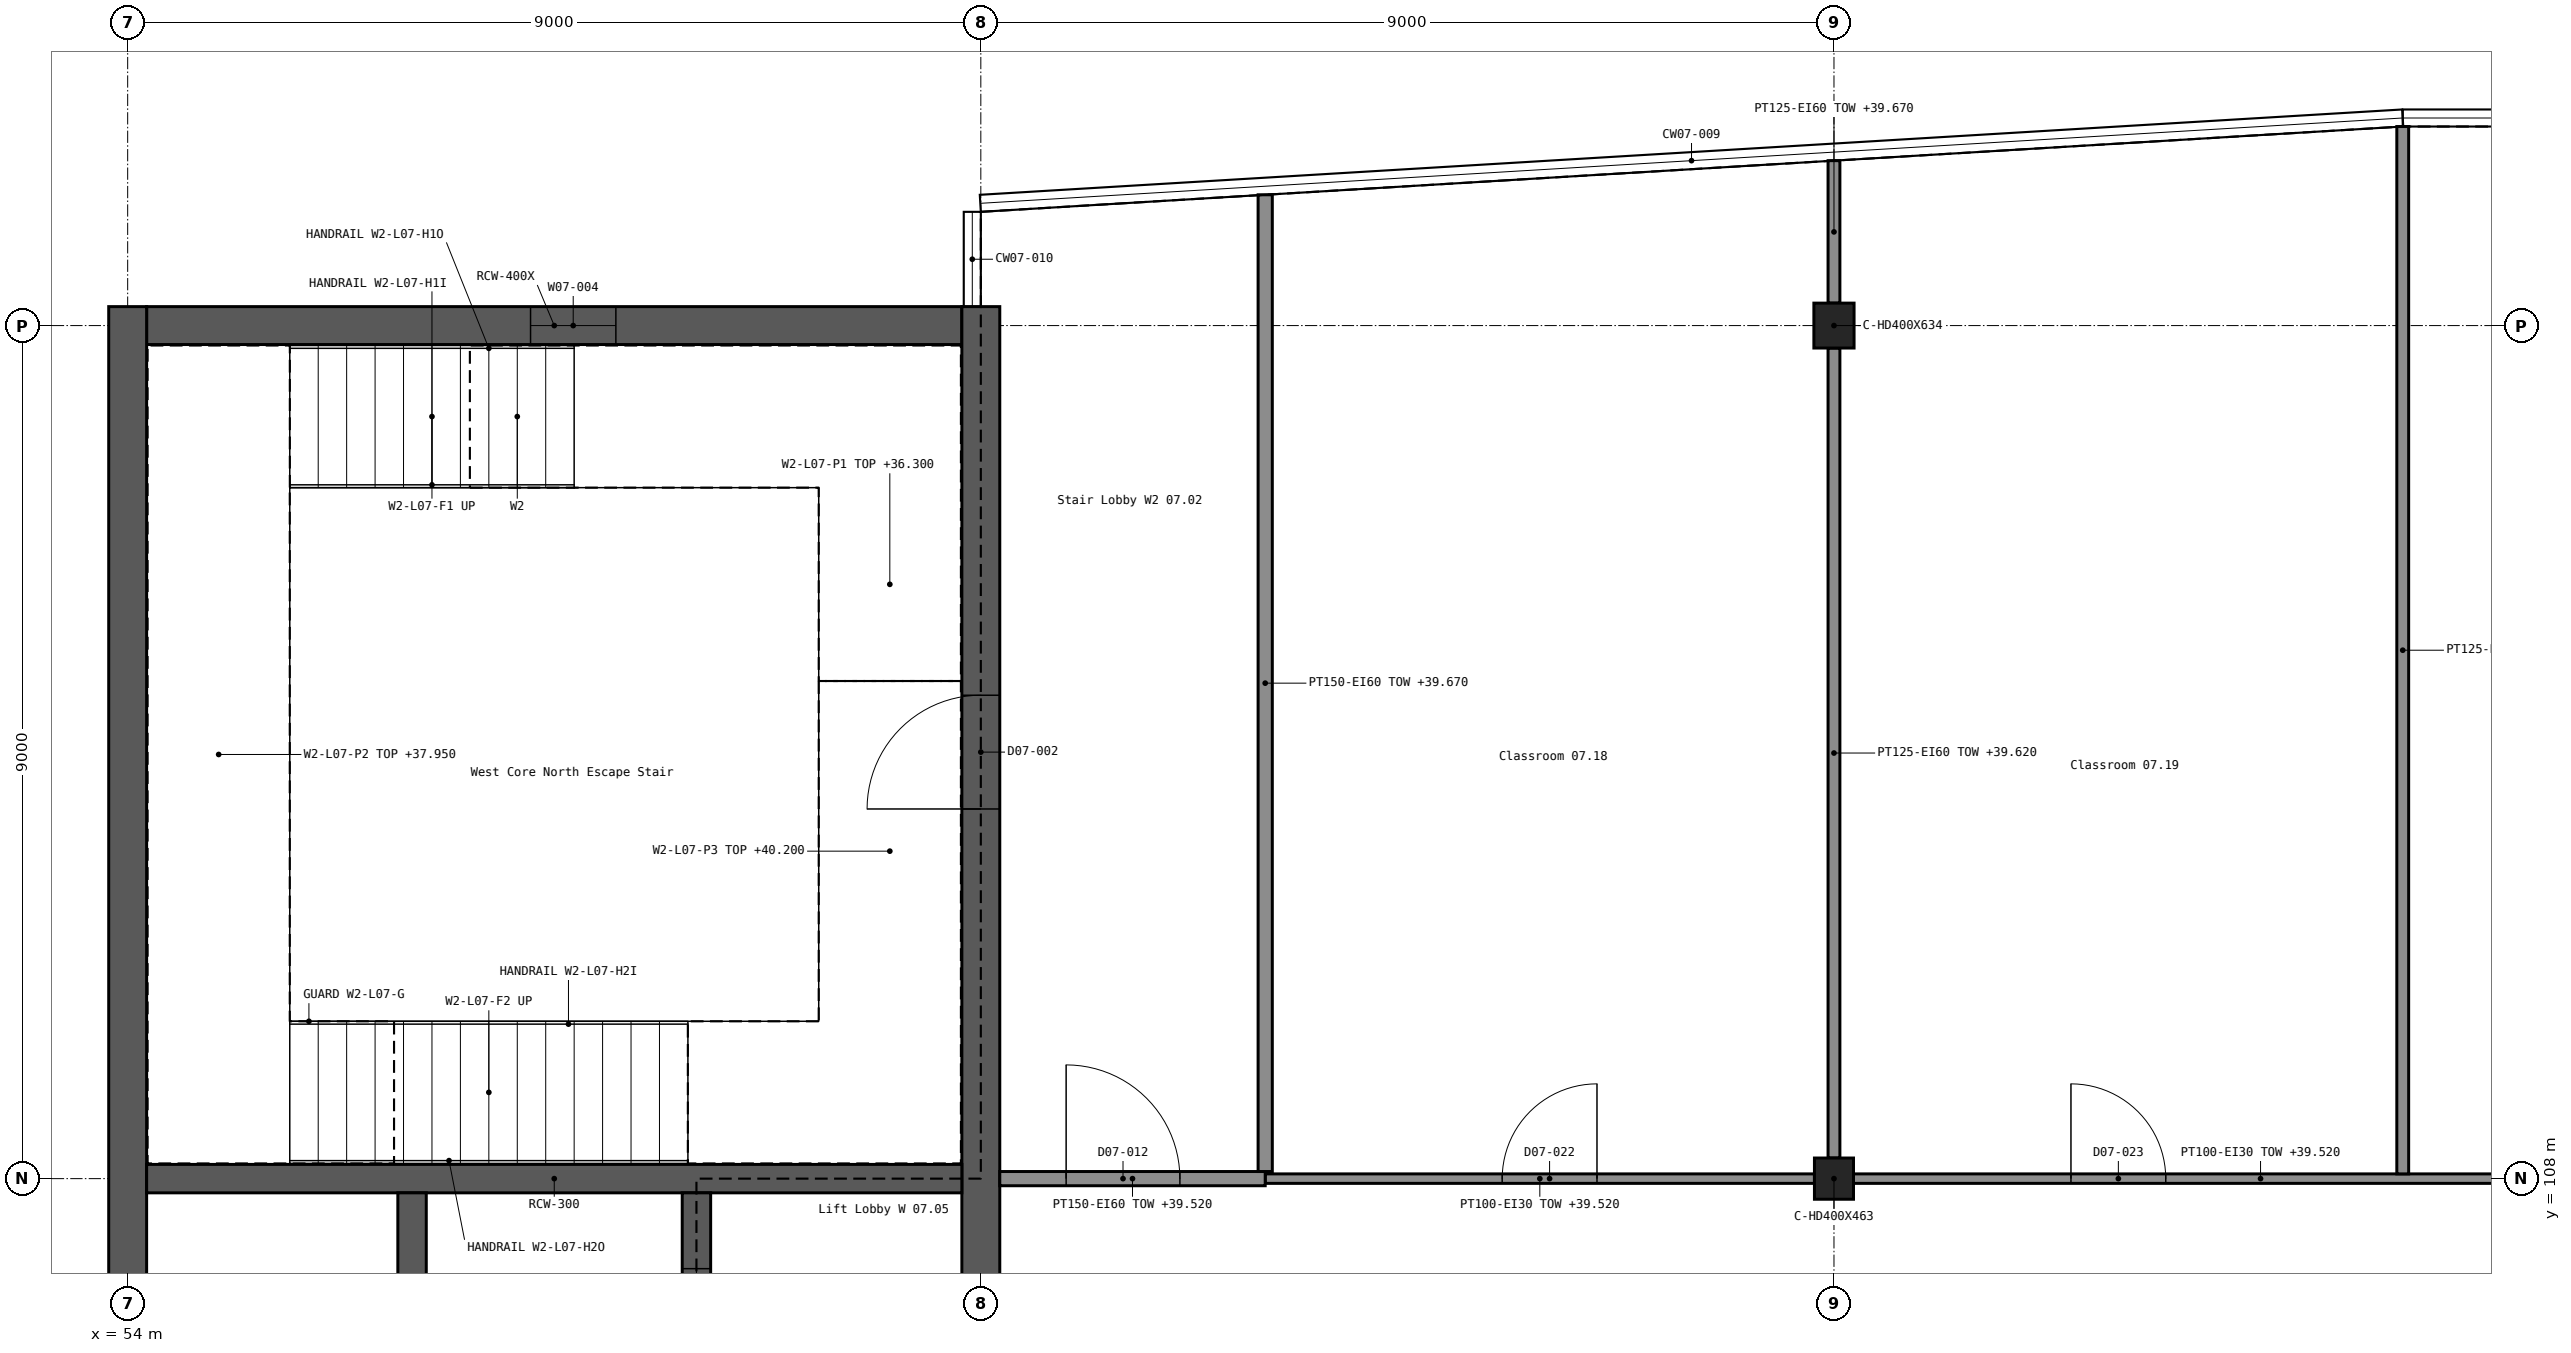
"""IFC4 building model, lengths in metres.
Left out: names, types, materials, properties, quantities, classifications, styles, units other than length and angle.
Written with IfcOpenShell. Run it as: python <this file> out.ifc"""

import sys

from ifc_helpers import new_model, si_unit, direction, frame, frame_2d, origin, origin_2d, place, context, subcontext, project, spatial, rectangle, i_section, extrude, element, fill, save


model = new_model("IFC4")
c1 = context("Model", 3, precision=1e-05, world=origin(), true_north=direction((0.0, 1.0)))
c2 = subcontext(c1, "Body", "Model", "MODEL_VIEW")
j1 = project(units=[si_unit("LENGTHUNIT", "METRE"), si_unit("PLANEANGLEUNIT", "RADIAN")], contexts=[c1])
p1 = place(None, origin())
s1 = spatial("IfcSite", under=j1, at=p1, CompositionType="ELEMENT")
p2 = place(p1, origin())
s2 = spatial("IfcBuilding", under=s1, at=p2, CompositionType="ELEMENT")
p3 = place(p2, frame((0.0, 0.0, 36.3)))
s3 = spatial("IfcBuildingStorey", under=s2, at=p3, CompositionType="ELEMENT", Elevation=36.3)
p4 = place(p3, frame((54.2, 117.0, 0.0), z_axis=(0.0, 0.0, 1.0), x_axis=(1.0, 0.0, 0.0)))
e1 = element("IfcWall", 1, at=p4, inside=s3, PredefinedType="SHEAR", context=c2, shape_type="SweptSolid", body=[
    extrude(rectangle(XDim=8.6, YDim=0.4, at=frame_2d((4.3, 0.0))), origin(), (0.0, 0.0, 1.0), 3.9),
])
p5 = place(p4, frame((4.05, 0.0, 1.2)))
e2 = element("IfcOpeningElement", 2, at=p5, cuts=e1, PredefinedType="OPENING", context=c2, shape_type="SweptSolid", body=[
    extrude(rectangle(XDim=0.9, YDim=1.5, at=frame_2d((0.45, 0.75))), frame((0.0, 0.211, 0.0), z_axis=(0.0, -1.0, 0.0), x_axis=(1.0, 0.0, 0.0)), (0.0, 0.0, 1.0), 0.422),
])
p6 = place(p3, frame((54.0, 89.8, 0.0), z_axis=(0.0, 0.0, 1.0), x_axis=(0.0, 1.0, 0.0)))
e3 = element("IfcWall", 3, at=p6, inside=s3, PredefinedType="SHEAR", context=c2, shape_type="SweptSolid", body=[
    extrude(rectangle(XDim=27.4, YDim=0.4, at=frame_2d((13.7, 0.0))), origin(), (0.0, 0.0, 1.0), 3.9),
])
p7 = place(p3, frame((63.0, 89.8, 0.0), z_axis=(0.0, 0.0, 1.0), x_axis=(0.0, 1.0, 0.0)))
e4 = element("IfcWall", 4, at=p7, inside=s3, PredefinedType="SHEAR", context=c2, shape_type="SweptSolid", body=[
    extrude(rectangle(XDim=27.4, YDim=0.4, at=frame_2d((13.7, 0.0))), origin(), (0.0, 0.0, 1.0), 3.9),
])
p8 = place(p7, frame((4.1, 0.0, 0.0)))
e5 = element("IfcOpeningElement", 5, at=p8, cuts=e4, PredefinedType="OPENING", context=c2, shape_type="SweptSolid", body=[
    extrude(rectangle(XDim=1.2, YDim=2.1, at=frame_2d((0.6, 1.05))), frame((0.0, 0.211, 0.0), z_axis=(0.0, -1.0, 0.0), x_axis=(1.0, 0.0, 0.0)), (0.0, 0.0, 1.0), 0.422),
])
p9 = place(p7, frame((22.1, 0.0, 0.0)))
e6 = element("IfcOpeningElement", 6, at=p9, cuts=e4, PredefinedType="OPENING", context=c2, shape_type="SweptSolid", body=[
    extrude(rectangle(XDim=1.2, YDim=2.1, at=frame_2d((0.6, 1.05))), frame((0.0, 0.211, 0.0), z_axis=(0.0, -1.0, 0.0), x_axis=(1.0, 0.0, 0.0)), (0.0, 0.0, 1.0), 0.422),
])
p10 = place(p7, frame((12.5, 0.0, 0.0)))
e7 = element("IfcOpeningElement", 7, at=p10, cuts=e4, PredefinedType="OPENING", context=c2, shape_type="SweptSolid", body=[
    extrude(rectangle(XDim=2.0, YDim=2.1, at=frame_2d((1.0, 1.05))), frame((0.0, 0.211, 0.0), z_axis=(0.0, -1.0, 0.0), x_axis=(1.0, 0.0, 0.0)), (0.0, 0.0, 1.0), 0.422),
])
p11 = place(p3, frame((54.2, 108.0, 0.0), z_axis=(0.0, 0.0, 1.0), x_axis=(1.0, 0.0, 0.0)))
e8 = element("IfcWall", 8, at=p11, inside=s3, PredefinedType="SHEAR", context=c2, shape_type="SweptSolid", body=[
    extrude(rectangle(XDim=8.6, YDim=0.3, at=frame_2d((4.3, 0.0))), origin(), (0.0, 0.0, 1.0), 3.9),
])
p12 = place(p3, frame((57.0, 99.15, 0.0), z_axis=(0.0, 0.0, 1.0), x_axis=(0.0, 1.0, 0.0)))
e9 = element("IfcWall", 9, at=p12, inside=s3, PredefinedType="SHEAR", context=c2, shape_type="SweptSolid", body=[
    extrude(rectangle(XDim=8.7, YDim=0.3, at=frame_2d((4.35, 0.0))), origin(), (0.0, 0.0, 1.0), 3.9),
])
p13 = place(p3, frame((60.0, 99.15, 0.0), z_axis=(0.0, 0.0, 1.0), x_axis=(0.0, 1.0, 0.0)))
e10 = element("IfcWall", 10, at=p13, inside=s3, PredefinedType="SHEAR", context=c2, shape_type="SweptSolid", body=[
    extrude(rectangle(XDim=8.7, YDim=0.3, at=frame_2d((4.35, 0.0))), origin(), (0.0, 0.0, 1.0), 3.9),
])
p14 = place(p13, frame((0.8, 0.0, 0.0)))
e11 = element("IfcOpeningElement", 11, at=p14, cuts=e10, PredefinedType="OPENING", context=c2, shape_type="SweptSolid", body=[
    extrude(rectangle(XDim=1.1, YDim=2.1, at=frame_2d((0.55, 1.05))), frame((0.0, 0.161, 0.0), z_axis=(0.0, -1.0, 0.0), x_axis=(1.0, 0.0, 0.0)), (0.0, 0.0, 1.0), 0.322),
])
p15 = place(p13, frame((3.8, 0.0, 0.0)))
e12 = element("IfcOpeningElement", 12, at=p15, cuts=e10, PredefinedType="OPENING", context=c2, shape_type="SweptSolid", body=[
    extrude(rectangle(XDim=1.1, YDim=2.1, at=frame_2d((0.55, 1.05))), frame((0.0, 0.161, 0.0), z_axis=(0.0, -1.0, 0.0), x_axis=(1.0, 0.0, 0.0)), (0.0, 0.0, 1.0), 0.322),
])
p16 = place(p13, frame((6.8, 0.0, 0.0)))
e13 = element("IfcOpeningElement", 13, at=p16, cuts=e10, PredefinedType="OPENING", context=c2, shape_type="SweptSolid", body=[
    extrude(rectangle(XDim=1.1, YDim=2.1, at=frame_2d((0.55, 1.05))), frame((0.0, 0.161, 0.0), z_axis=(0.0, -1.0, 0.0), x_axis=(1.0, 0.0, 0.0)), (0.0, 0.0, 1.0), 0.322),
])
p17 = place(p3, frame((72.0, 108.0, 0.0), z_axis=(0.0, 0.0, 1.0), x_axis=(1.0, 0.0, 0.0)))
e14 = element("IfcColumn", 14, at=p17, inside=s3, PredefinedType="COLUMN", context=c2, shape_type="SweptSolid", body=[
    extrude(i_section(OverallWidth=0.412, OverallDepth=0.435, WebThickness=0.036, FlangeThickness=0.057, FilletRadius=0.015, at=origin_2d()), origin(), (0.0, 0.0, 1.0), 3.9),
])
p18 = place(p3, frame((72.0, 117.0, 0.0), z_axis=(0.0, 0.0, 1.0), x_axis=(1.0, 0.0, 0.0)))
e15 = element("IfcColumn", 15, at=p18, inside=s3, PredefinedType="COLUMN", context=c2, shape_type="SweptSolid", body=[
    extrude(i_section(OverallWidth=0.424, OverallDepth=0.474, WebThickness=0.048, FlangeThickness=0.077, FilletRadius=0.015, at=origin_2d()), origin(), (0.0, 0.0, 1.0), 3.9),
])
p19 = place(p3, frame((66.0, 108.0, 0.0), z_axis=(0.0, 0.0, 1.0), x_axis=(1.0, 0.0, 0.0)))
e16 = element("IfcWall", 16, at=p19, inside=s3, PredefinedType="PARTITIONING", context=c2, shape_type="SweptSolid", body=[
    extrude(rectangle(XDim=5.794, YDim=0.1, at=frame_2d((2.897, 0.0))), origin(), (0.0, 0.0, 1.0), 3.22),
])
p20 = place(p19, frame((2.5, 0.0, 0.0)))
e17 = element("IfcOpeningElement", 17, at=p20, cuts=e16, PredefinedType="OPENING", context=c2, shape_type="SweptSolid", body=[
    extrude(rectangle(XDim=1.0, YDim=2.1, at=frame_2d((0.5, 1.05))), frame((0.0, 0.061, 0.0), z_axis=(0.0, -1.0, 0.0), x_axis=(1.0, 0.0, 0.0)), (0.0, 0.0, 1.0), 0.122),
])
p21 = place(p3, frame((72.206, 108.0, 0.0), z_axis=(0.0, 0.0, 1.0), x_axis=(1.0, 0.0, 0.0)))
e18 = element("IfcWall", 18, at=p21, inside=s3, PredefinedType="PARTITIONING", context=c2, shape_type="SweptSolid", body=[
    extrude(rectangle(XDim=8.588, YDim=0.1, at=frame_2d((4.294, 0.0))), origin(), (0.0, 0.0, 1.0), 3.22),
])
p22 = place(p21, frame((2.294, 0.0, 0.0)))
e19 = element("IfcOpeningElement", 19, at=p22, cuts=e18, PredefinedType="OPENING", context=c2, shape_type="SweptSolid", body=[
    extrude(rectangle(XDim=1.0, YDim=2.1, at=frame_2d((0.5, 1.05))), frame((0.0, 0.061, 0.0), z_axis=(0.0, -1.0, 0.0), x_axis=(1.0, 0.0, 0.0)), (0.0, 0.0, 1.0), 0.122),
])
p23 = place(p3, frame((63.2, 108.0, 0.0), z_axis=(0.0, 0.0, 1.0), x_axis=(1.0, 0.0, 0.0)))
e20 = element("IfcWall", 20, at=p23, inside=s3, PredefinedType="PARTITIONING", context=c2, shape_type="SweptSolid", body=[
    extrude(rectangle(XDim=2.8, YDim=0.15, at=frame_2d((1.4, 0.0))), origin(), (0.0, 0.0, 1.0), 3.22),
])
p24 = place(p23, frame((0.7, 0.0, 0.0)))
e21 = element("IfcOpeningElement", 21, at=p24, cuts=e20, PredefinedType="OPENING", context=c2, shape_type="SweptSolid", body=[
    extrude(rectangle(XDim=1.2, YDim=2.1, at=frame_2d((0.6, 1.05))), frame((0.0, 0.086, 0.0), z_axis=(0.0, -1.0, 0.0), x_axis=(1.0, 0.0, 0.0)), (0.0, 0.0, 1.0), 0.172),
])
p25 = place(p3, frame((66.0, 108.075, 0.0), z_axis=(0.0, 0.0, 1.0), x_axis=(0.0, 1.0, 0.0)))
e22 = element("IfcWall", 22, at=p25, inside=s3, PredefinedType="PARTITIONING", context=c2, shape_type="SweptSolid", body=[
    extrude(rectangle(XDim=10.305, YDim=0.15, at=frame_2d((5.152, 0.0))), origin(), (0.0, 0.0, 1.0), 3.37),
])
p26 = place(p3, frame((72.0, 108.218, 0.0), z_axis=(0.0, 0.0, 1.0), x_axis=(0.0, 1.0, 0.0)))
e23 = element("IfcWall", 23, at=p26, inside=s3, PredefinedType="PARTITIONING", context=c2, shape_type="SweptSolid", body=[
    extrude(rectangle(XDim=8.545, YDim=0.125, at=frame_2d((4.273, 0.0))), origin(), (0.0, 0.0, 1.0), 3.32),
])
p27 = place(p3, frame((72.0, 117.237, 0.0), z_axis=(0.0, 0.0, 1.0), x_axis=(0.0, 1.0, 0.0)))
e24 = element("IfcWall", 24, at=p27, inside=s3, PredefinedType="PARTITIONING", context=c2, shape_type="SweptSolid", body=[
    extrude(rectangle(XDim=1.503, YDim=0.125, at=frame_2d((0.751, 0.0))), origin(), (0.0, 0.0, 1.0), 3.37),
])
p28 = place(p3, frame((78.0, 108.05, 0.0), z_axis=(0.0, 0.0, 1.0), x_axis=(0.0, 1.0, 0.0)))
e25 = element("IfcWall", 25, at=p28, inside=s3, PredefinedType="PARTITIONING", context=c2, shape_type="SweptSolid", body=[
    extrude(rectangle(XDim=11.05, YDim=0.125, at=frame_2d((5.525, 0.0))), origin(), (0.0, 0.0, 1.0), 3.37),
])
p29 = place(p5, origin())
e26 = element("IfcWindow", 26, at=p29, inside=s3, PartitioningType="SINGLE_PANEL", PredefinedType="WINDOW", context=c2, shape_type="SweptSolid", body=[
    extrude(rectangle(XDim=0.9, YDim=1.5, at=frame_2d((0.45, 0.75))), frame((0.0, 0.03, 0.0), z_axis=(0.0, -1.0, 0.0), x_axis=(1.0, 0.0, 0.0)), (0.0, 0.0, 1.0), 0.06),
])
fill(e2, e26)
p30 = place(p9, origin())
e27 = element("IfcDoor", 27, at=p30, inside=s3, OperationType="SINGLE_SWING_LEFT", PredefinedType="DOOR", context=c2, shape_type="SweptSolid", body=[
    extrude(rectangle(XDim=1.2, YDim=2.1, at=frame_2d((0.6, 1.05))), frame((0.0, 0.025, 0.0), z_axis=(0.0, -1.0, 0.0), x_axis=(1.0, 0.0, 0.0)), (0.0, 0.0, 1.0), 0.05),
])
fill(e6, e27)
p31 = place(p16, origin())
e28 = element("IfcDoor", 28, at=p31, inside=s3, OperationType="DOUBLE_DOOR_SLIDING", PredefinedType="DOOR", context=c2, shape_type="SweptSolid", body=[
    extrude(rectangle(XDim=1.1, YDim=2.1, at=frame_2d((0.55, 1.05))), frame((0.0, 0.025, 0.0), z_axis=(0.0, -1.0, 0.0), x_axis=(1.0, 0.0, 0.0)), (0.0, 0.0, 1.0), 0.05),
])
fill(e13, e28)
p32 = place(p24, origin())
e29 = element("IfcDoor", 29, at=p32, inside=s3, OperationType="SINGLE_SWING_LEFT", PredefinedType="DOOR", context=c2, shape_type="SweptSolid", body=[
    extrude(rectangle(XDim=1.2, YDim=2.1, at=frame_2d((0.6, 1.05))), frame((0.0, 0.025, 0.0), z_axis=(0.0, -1.0, 0.0), x_axis=(1.0, 0.0, 0.0)), (0.0, 0.0, 1.0), 0.05),
])
fill(e21, e29)
p33 = place(p20, origin())
e30 = element("IfcDoor", 30, at=p33, inside=s3, OperationType="SINGLE_SWING_RIGHT", PredefinedType="DOOR", context=c2, shape_type="SweptSolid", body=[
    extrude(rectangle(XDim=1.0, YDim=2.1, at=frame_2d((0.5, 1.05))), frame((0.0, 0.025, 0.0), z_axis=(0.0, -1.0, 0.0), x_axis=(1.0, 0.0, 0.0)), (0.0, 0.0, 1.0), 0.05),
])
fill(e17, e30)
p34 = place(p22, origin())
e31 = element("IfcDoor", 31, at=p34, inside=s3, OperationType="SINGLE_SWING_LEFT", PredefinedType="DOOR", context=c2, shape_type="SweptSolid", body=[
    extrude(rectangle(XDim=1.0, YDim=2.1, at=frame_2d((0.5, 1.05))), frame((0.0, 0.025, 0.0), z_axis=(0.0, -1.0, 0.0), x_axis=(1.0, 0.0, 0.0)), (0.0, 0.0, 1.0), 0.05),
])
fill(e19, e31)
save(model, sys.argv[1])
